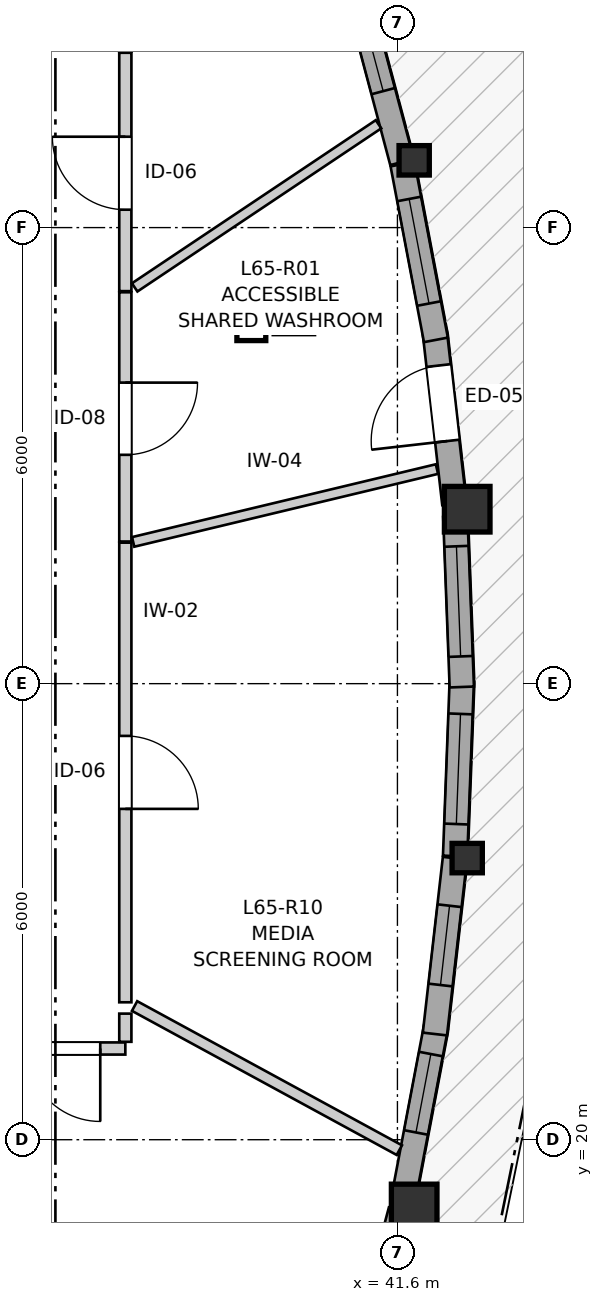
"""IFC4 building model, lengths in metres.
Left out: names, types, materials, properties, quantities, classifications, styles, units other than length and angle.
Written with IfcOpenShell. Run it as: python <this file> out.ifc"""

import sys

from ifc_helpers import new_model, si_unit, direction, frame, frame_2d, origin, origin_2d, place, context, subcontext, project, spatial, rectangle, i_section, extrude, source, transform, mapped, element, fill, save


model = new_model("IFC4")
c1 = context("Model", 3, precision=1e-05, world=origin(), true_north=direction((0.0, 1.0)))
c2 = subcontext(c1, "Body", "Model", "MODEL_VIEW")
j1 = project(units=[si_unit("LENGTHUNIT", "METRE"), si_unit("PLANEANGLEUNIT", "RADIAN")], contexts=[c1])
p1 = place(None, origin())
s1 = spatial("IfcSite", under=j1, at=p1, CompositionType="ELEMENT")
p2 = place(p1, origin())
s2 = spatial("IfcBuilding", under=s1, at=p2, CompositionType="ELEMENT")
p3 = place(p2, frame((0.0, 0.0, 218.0)))
s3 = spatial("IfcBuildingStorey", under=s2, at=p3, CompositionType="ELEMENT", Elevation=218.0)
m1 = source(origin(), c2, "Body", "SweptSolid", [
    extrude(rectangle(XDim=0.6, YDim=0.6, at=origin_2d()), origin(), (0.0, 0.0, 1.0), 2.96),
])
p4 = place(p3, frame((41.82, 19.115, 0.0), z_axis=(0.0, 0.0, 1.0), x_axis=(1.0, 0.0, 0.0)))
e1 = element("IfcColumn", 1, at=p4, inside=s3, PredefinedType="COLUMN", context=c2, shape_type="MappedRepresentation", body=[
    mapped(m1, transform((0.0, 0.0, 0.0), x_axis=(1.0, 0.0, 0.0), y_axis=(0.0, 1.0, 0.0), z_axis=(0.0, 0.0, 1.0), scale=1.0)),
])
m2 = source(origin(), c2, "Body", "SweptSolid", [
    extrude(i_section(OverallWidth=0.398, OverallDepth=0.387, WebThickness=0.019, FlangeThickness=0.03, FilletRadius=0.015, at=origin_2d()), origin(), (0.0, 0.0, 1.0), 2.96),
])
p5 = place(p3, frame((42.518, 23.705, 0.0), z_axis=(0.0, 0.0, 1.0), x_axis=(1.0, 0.0, 0.0)))
e2 = element("IfcColumn", 2, at=p5, inside=s3, PredefinedType="PILASTER", context=c2, shape_type="MappedRepresentation", body=[
    mapped(m2, transform((0.0, 0.0, 0.0), x_axis=(1.0, 0.0, 0.0), y_axis=(0.0, 1.0, 0.0), z_axis=(0.0, 0.0, 1.0), scale=1.0)),
])
p6 = place(p3, frame((42.518, 28.295, 0.0), z_axis=(0.0, 0.0, 1.0), x_axis=(1.0, 0.0, 0.0)))
e3 = element("IfcColumn", 3, at=p6, inside=s3, PredefinedType="COLUMN", context=c2, shape_type="MappedRepresentation", body=[
    mapped(m1, transform((0.0, 0.0, 0.0), x_axis=(1.0, 0.0, 0.0), y_axis=(0.0, 1.0, 0.0), z_axis=(0.0, 0.0, 1.0), scale=1.0)),
])
p7 = place(p3, frame((41.82, 32.885, 0.0), z_axis=(0.0, 0.0, 1.0), x_axis=(1.0, 0.0, 0.0)))
e4 = element("IfcColumn", 4, at=p7, inside=s3, PredefinedType="PILASTER", context=c2, shape_type="MappedRepresentation", body=[
    mapped(m2, transform((0.0, 0.0, 0.0), x_axis=(1.0, 0.0, 0.0), y_axis=(0.0, 1.0, 0.0), z_axis=(0.0, 0.0, 1.0), scale=1.0)),
])
p8 = place(p3, frame((41.045, 16.824, 0.0), z_axis=(0.0, 0.0, 1.0), x_axis=(0.257099982868, 0.966384808867, 0.0)))
e5 = element("IfcWall", 5, at=p8, inside=s3, PredefinedType="SOLIDWALL", context=c2, shape_type="SweptSolid", body=[
    extrude(rectangle(XDim=2.323, YDim=0.32, at=frame_2d((1.161, 0.0))), origin(), (0.0, 0.0, 1.0), 2.58),
])
p9 = place(p8, frame((0.491, 0.0, 0.82)))
e6 = element("IfcOpeningElement", 6, at=p9, cuts=e5, PredefinedType="OPENING", context=c2, shape_type="SweptSolid", body=[
    extrude(rectangle(XDim=1.35, YDim=1.45, at=frame_2d((0.675, 0.725))), frame((0.0, 0.17, 0.0), z_axis=(0.0, -1.0, 0.0), x_axis=(1.0, 0.0, 0.0)), (0.0, 0.0, 1.0), 0.34),
])
p10 = place(p3, frame((41.68, 19.233, 0.0), z_axis=(0.0, 0.0, 1.0), x_axis=(0.186630727552, 0.982430135701, 0.0)))
e7 = element("IfcWall", 7, at=p10, inside=s3, PredefinedType="SOLIDWALL", context=c2, shape_type="SweptSolid", body=[
    extrude(rectangle(XDim=2.284, YDim=0.32, at=frame_2d((1.142, 0.0))), origin(), (0.0, 0.0, 1.0), 2.58),
])
p11 = place(p10, frame((0.878, 0.0, 0.82)))
e8 = element("IfcOpeningElement", 8, at=p11, cuts=e7, PredefinedType="OPENING", context=c2, shape_type="SweptSolid", body=[
    extrude(rectangle(XDim=1.05, YDim=1.45, at=frame_2d((0.525, 0.725))), frame((0.0, 0.17, 0.0), z_axis=(0.0, -1.0, 0.0), x_axis=(1.0, 0.0, 0.0)), (0.0, 0.0, 1.0), 0.34),
])
p12 = place(p3, frame((42.093, 21.39, 0.0), z_axis=(0.0, 0.0, 1.0), x_axis=(0.113262644001, 0.993565082656, 0.0)))
e9 = element("IfcWall", 9, at=p12, inside=s3, PredefinedType="SOLIDWALL", context=c2, shape_type="SweptSolid", body=[
    extrude(rectangle(XDim=2.328, YDim=0.32, at=frame_2d((1.164, 0.0))), origin(), (0.0, 0.0, 1.0), 2.58),
])
p13 = place(p12, frame((0.649, 0.0, 0.82)))
e10 = element("IfcOpeningElement", 10, at=p13, cuts=e9, PredefinedType="OPENING", context=c2, shape_type="SweptSolid", body=[
    extrude(rectangle(XDim=1.05, YDim=1.45, at=frame_2d((0.525, 0.725))), frame((0.0, 0.17, 0.0), z_axis=(0.0, -1.0, 0.0), x_axis=(1.0, 0.0, 0.0)), (0.0, 0.0, 1.0), 0.34),
])
p14 = place(p3, frame((42.359, 23.731, 0.0), z_axis=(0.0, 0.0, 1.0), x_axis=(0.037975332386, 0.999278676912, 0.0)))
e11 = element("IfcWall", 11, at=p14, inside=s3, PredefinedType="SOLIDWALL", context=c2, shape_type="SweptSolid", body=[
    extrude(rectangle(XDim=2.314, YDim=0.32, at=frame_2d((1.157, 0.0))), origin(), (0.0, 0.0, 1.0), 2.58),
])
p15 = place(p14, frame((0.422, 0.0, 0.82)))
e12 = element("IfcOpeningElement", 12, at=p15, cuts=e11, PredefinedType="OPENING", context=c2, shape_type="SweptSolid", body=[
    extrude(rectangle(XDim=1.45, YDim=1.25, at=frame_2d((0.725, 0.625))), frame((0.0, 0.17, 0.0), z_axis=(0.0, -1.0, 0.0), x_axis=(1.0, 0.0, 0.0)), (0.0, 0.0, 1.0), 0.34),
])
p16 = place(p3, frame((42.447, 25.956, 0.0), z_axis=(0.0, 0.0, 1.0), x_axis=(-0.037961080573, 0.999279218418, 0.0)))
e13 = element("IfcWall", 13, at=p16, inside=s3, PredefinedType="SOLIDWALL", context=c2, shape_type="SweptSolid", body=[
    extrude(rectangle(XDim=2.245, YDim=0.32, at=frame_2d((1.122, 0.0))), origin(), (0.0, 0.0, 1.0), 2.58),
])
p17 = place(p16, frame((0.402, 0.0, 0.82)))
e14 = element("IfcOpeningElement", 14, at=p17, cuts=e13, PredefinedType="OPENING", context=c2, shape_type="SweptSolid", body=[
    extrude(rectangle(XDim=1.45, YDim=1.25, at=frame_2d((0.725, 0.625))), frame((0.0, 0.17, 0.0), z_axis=(0.0, -1.0, 0.0), x_axis=(1.0, 0.0, 0.0)), (0.0, 0.0, 1.0), 0.34),
])
p18 = place(p3, frame((42.349, 28.366, 0.0), z_axis=(0.0, 0.0, 1.0), x_axis=(-0.113314829757, 0.99355913229, 0.0)))
e15 = element("IfcWall", 15, at=p18, inside=s3, PredefinedType="SOLIDWALL", context=c2, shape_type="SweptSolid", body=[
    extrude(rectangle(XDim=2.258, YDim=0.32, at=frame_2d((1.129, 0.0))), origin(), (0.0, 0.0, 1.0), 2.58),
])
p19 = place(p18, frame((0.83, 0.0, 0.0)))
e16 = element("IfcOpeningElement", 16, at=p19, cuts=e15, PredefinedType="OPENING", context=c2, shape_type="SweptSolid", body=[
    extrude(rectangle(XDim=1.0, YDim=2.1, at=frame_2d((0.5, 1.05))), frame((0.0, 0.17, 0.0), z_axis=(0.0, -1.0, 0.0), x_axis=(1.0, 0.0, 0.0)), (0.0, 0.0, 1.0), 0.34),
])
p20 = place(p3, frame((42.106, 30.523, 0.0), z_axis=(0.0, 0.0, 1.0), x_axis=(-0.186673658051, 0.982421979289, 0.0)))
e17 = element("IfcWall", 17, at=p20, inside=s3, PredefinedType="SOLIDWALL", context=c2, shape_type="SweptSolid", body=[
    extrude(rectangle(XDim=2.354, YDim=0.32, at=frame_2d((1.177, 0.0))), origin(), (0.0, 0.0, 1.0), 2.58),
])
p21 = place(p20, frame((0.487, 0.0, 0.82)))
e18 = element("IfcOpeningElement", 18, at=p21, cuts=e17, PredefinedType="OPENING", context=c2, shape_type="SweptSolid", body=[
    extrude(rectangle(XDim=1.4, YDim=1.35, at=frame_2d((0.7, 0.675))), frame((0.0, 0.17, 0.0), z_axis=(0.0, -1.0, 0.0), x_axis=(1.0, 0.0, 0.0)), (0.0, 0.0, 1.0), 0.34),
])
p22 = place(p3, frame((41.66, 32.863, 0.0), z_axis=(0.0, 0.0, 1.0), x_axis=(-0.257008511659, 0.966409139513, 0.0)))
e19 = element("IfcWall", 19, at=p22, inside=s3, PredefinedType="SOLIDWALL", context=c2, shape_type="SweptSolid", body=[
    extrude(rectangle(XDim=2.393, YDim=0.32, at=frame_2d((1.196, 0.0))), origin(), (0.0, 0.0, 1.0), 2.58),
])
p23 = place(p22, frame((0.965, 0.0, 0.82)))
e20 = element("IfcOpeningElement", 20, at=p23, cuts=e19, PredefinedType="OPENING", context=c2, shape_type="SweptSolid", body=[
    extrude(rectangle(XDim=0.95, YDim=1.35, at=frame_2d((0.475, 0.675))), frame((0.0, 0.17, 0.0), z_axis=(0.0, -1.0, 0.0), x_axis=(1.0, 0.0, 0.0)), (0.0, 0.0, 1.0), 0.34),
])
p24 = place(p3, frame((38.02, 27.855, 0.0), z_axis=(0.0, 0.0, 1.0), x_axis=(0.0, -1.0, 0.0)))
e21 = element("IfcWall", 21, at=p24, inside=s3, PredefinedType="PARTITIONING", context=c2, shape_type="SweptSolid", body=[
    extrude(rectangle(XDim=6.047, YDim=0.16, at=frame_2d((3.023, 0.0))), origin(), (0.0, 0.0, 1.0), 2.96),
])
p25 = place(p24, frame((2.542, 0.0, 0.0)))
e22 = element("IfcOpeningElement", 22, at=p25, cuts=e21, PredefinedType="OPENING", context=c2, shape_type="SweptSolid", body=[
    extrude(rectangle(XDim=0.96, YDim=2.1, at=frame_2d((0.48, 1.05))), frame((0.0, 0.09, 0.0), z_axis=(0.0, -1.0, 0.0), x_axis=(1.0, 0.0, 0.0)), (0.0, 0.0, 1.0), 0.18),
])
p26 = place(p3, frame((38.02, 31.149, 0.0), z_axis=(0.0, 0.0, 1.0), x_axis=(0.0, -1.0, 0.0)))
e23 = element("IfcWall", 23, at=p26, inside=s3, PredefinedType="PARTITIONING", context=c2, shape_type="SweptSolid", body=[
    extrude(rectangle(XDim=3.279, YDim=0.16, at=frame_2d((1.639, 0.0))), origin(), (0.0, 0.0, 1.0), 2.628),
])
p27 = place(p26, frame((1.188, 0.0, 0.0)))
e24 = element("IfcOpeningElement", 24, at=p27, cuts=e23, PredefinedType="OPENING", context=c2, shape_type="SweptSolid", body=[
    extrude(rectangle(XDim=0.95, YDim=2.1, at=frame_2d((0.475, 1.05))), frame((0.0, 0.09, 0.0), z_axis=(0.0, -1.0, 0.0), x_axis=(1.0, 0.0, 0.0)), (0.0, 0.0, 1.0), 0.18),
])
p28 = place(p3, frame((38.02, 31.164, 0.0), z_axis=(0.0, 0.0, 1.0), x_axis=(0.0, 1.0, 0.0)))
e25 = element("IfcWall", 25, at=p28, inside=s3, PredefinedType="PARTITIONING", context=c2, shape_type="SweptSolid", body=[
    extrude(rectangle(XDim=3.136, YDim=0.16, at=frame_2d((1.568, 0.0))), origin(), (0.0, 0.0, 1.0), 2.628),
])
p29 = place(p28, frame((1.072, 0.0, 0.0)))
e26 = element("IfcOpeningElement", 26, at=p29, cuts=e25, PredefinedType="OPENING", context=c2, shape_type="SweptSolid", body=[
    extrude(rectangle(XDim=0.96, YDim=2.1, at=frame_2d((0.48, 1.05))), frame((0.0, 0.09, 0.0), z_axis=(0.0, -1.0, 0.0), x_axis=(1.0, 0.0, 0.0)), (0.0, 0.0, 1.0), 0.18),
])
p30 = place(p3, frame((38.02, 21.2, 0.0), z_axis=(0.0, 0.0, 1.0), x_axis=(-1.0, 0.0, 0.0)))
e27 = element("IfcWall", 27, at=p30, inside=s3, PredefinedType="PARTITIONING", context=c2, shape_type="SweptSolid", body=[
    extrude(rectangle(XDim=1.612, YDim=0.16, at=frame_2d((0.806, 0.0))), origin(), (0.0, 0.0, 1.0), 2.96),
])
p31 = place(p30, frame((0.33, 0.0, 0.0)))
e28 = element("IfcOpeningElement", 28, at=p31, cuts=e27, PredefinedType="OPENING", context=c2, shape_type="SweptSolid", body=[
    extrude(rectangle(XDim=0.96, YDim=2.1, at=frame_2d((0.48, 1.05))), frame((0.0, 0.09, 0.0), z_axis=(0.0, -1.0, 0.0), x_axis=(1.0, 0.0, 0.0)), (0.0, 0.0, 1.0), 0.18),
])
p32 = place(p3, frame((38.123, 27.865, 0.0), z_axis=(0.0, 0.0, 1.0), x_axis=(0.972444961782, 0.233132572379, 0.0)))
e29 = element("IfcWall", 29, at=p32, inside=s3, PredefinedType="PARTITIONING", context=c2, shape_type="SweptSolid", body=[
    extrude(rectangle(XDim=4.11, YDim=0.13, at=frame_2d((2.055, 0.0))), origin(), (0.0, 0.0, 1.0), 2.96),
])
p33 = place(p3, frame((38.142, 21.759, 0.0), z_axis=(0.0, 0.0, 1.0), x_axis=(0.878323390095, -0.478066964359, 0.0)))
e30 = element("IfcWall", 30, at=p33, inside=s3, PredefinedType="PARTITIONING", context=c2, shape_type="SweptSolid", body=[
    extrude(rectangle(XDim=3.966, YDim=0.145, at=frame_2d((1.983, 0.0))), origin(), (0.0, 0.0, 1.0), 2.96),
])
p34 = place(p3, frame((38.143, 31.213, 0.0), z_axis=(0.0, 0.0, 1.0), x_axis=(0.831154063558, 0.556042195009, 0.0)))
e31 = element("IfcWall", 31, at=p34, inside=s3, PredefinedType="PARTITIONING", context=c2, shape_type="SweptSolid", body=[
    extrude(rectangle(XDim=3.86, YDim=0.13, at=frame_2d((1.93, 0.0))), origin(), (0.0, 0.0, 1.0), 2.96),
])
p35 = place(p3, frame((38.02, 21.288, 0.0), z_axis=(0.0, 0.0, 1.0), x_axis=(0.0, 1.0, 0.0)))
e32 = element("IfcWall", 32, at=p35, inside=s3, PredefinedType="PARTITIONING", context=c2, shape_type="SweptSolid", body=[
    extrude(rectangle(XDim=0.371, YDim=0.16, at=frame_2d((0.186, 0.0))), origin(), (0.0, 0.0, 1.0), 2.96),
])
m3 = source(origin(), c2, "Body", "SweptSolid", [
    extrude(rectangle(XDim=1.05, YDim=1.45, at=frame_2d((0.525, 0.725))), frame((0.0, 0.03, 0.0), z_axis=(0.0, -1.0, 0.0), x_axis=(1.0, 0.0, 0.0)), (0.0, 0.0, 1.0), 0.06),
])
p36 = place(p11, origin())
e33 = element("IfcWindow", 33, at=p36, inside=s3, PartitioningType="SINGLE_PANEL", PredefinedType="WINDOW", context=c2, shape_type="MappedRepresentation", body=[
    mapped(m3, transform((0.0, 0.0, 0.0), x_axis=(1.0, 0.0, 0.0), y_axis=(0.0, 1.0, 0.0), z_axis=(0.0, 0.0, 1.0), scale=1.0)),
])
fill(e8, e33)
p37 = place(p13, origin())
e34 = element("IfcWindow", 34, at=p37, inside=s3, PartitioningType="SINGLE_PANEL", PredefinedType="WINDOW", context=c2, shape_type="MappedRepresentation", body=[
    mapped(m3, transform((0.0, 0.0, 0.0), x_axis=(1.0, 0.0, 0.0), y_axis=(0.0, 1.0, 0.0), z_axis=(0.0, 0.0, 1.0), scale=1.0)),
])
fill(e10, e34)
m4 = source(origin(), c2, "Body", "SweptSolid", [
    extrude(rectangle(XDim=1.45, YDim=1.25, at=frame_2d((0.725, 0.625))), frame((0.0, 0.03, 0.0), z_axis=(0.0, -1.0, 0.0), x_axis=(1.0, 0.0, 0.0)), (0.0, 0.0, 1.0), 0.06),
])
p38 = place(p15, origin())
e35 = element("IfcWindow", 35, at=p38, inside=s3, PartitioningType="SINGLE_PANEL", PredefinedType="WINDOW", context=c2, shape_type="MappedRepresentation", body=[
    mapped(m4, transform((0.0, 0.0, 0.0), x_axis=(1.0, 0.0, 0.0), y_axis=(0.0, 1.0, 0.0), z_axis=(0.0, 0.0, 1.0), scale=1.0)),
])
fill(e12, e35)
p39 = place(p17, origin())
e36 = element("IfcWindow", 36, at=p39, inside=s3, PartitioningType="SINGLE_PANEL", PredefinedType="WINDOW", context=c2, shape_type="MappedRepresentation", body=[
    mapped(m4, transform((0.0, 0.0, 0.0), x_axis=(1.0, 0.0, 0.0), y_axis=(0.0, 1.0, 0.0), z_axis=(0.0, 0.0, 1.0), scale=1.0)),
])
fill(e14, e36)
m5 = source(origin(), c2, "Body", "SweptSolid", [
    extrude(rectangle(XDim=1.0, YDim=2.1, at=frame_2d((0.5, 1.05))), frame((0.0, 0.025, 0.0), z_axis=(0.0, -1.0, 0.0), x_axis=(1.0, 0.0, 0.0)), (0.0, 0.0, 1.0), 0.05),
])
p40 = place(p19, origin())
e37 = element("IfcDoor", 37, at=p40, inside=s3, OperationType="SINGLE_SWING_LEFT", PredefinedType="DOOR", context=c2, shape_type="MappedRepresentation", body=[
    mapped(m5, transform((0.0, 0.0, 0.0), x_axis=(1.0, 0.0, 0.0), y_axis=(0.0, 1.0, 0.0), z_axis=(0.0, 0.0, 1.0), scale=1.0)),
])
fill(e16, e37)
m6 = source(origin(), c2, "Body", "SweptSolid", [
    extrude(rectangle(XDim=1.4, YDim=1.35, at=frame_2d((0.7, 0.675))), frame((0.0, 0.03, 0.0), z_axis=(0.0, -1.0, 0.0), x_axis=(1.0, 0.0, 0.0)), (0.0, 0.0, 1.0), 0.06),
])
p41 = place(p21, origin())
e38 = element("IfcWindow", 38, at=p41, inside=s3, PartitioningType="SINGLE_PANEL", PredefinedType="WINDOW", context=c2, shape_type="MappedRepresentation", body=[
    mapped(m6, transform((0.0, 0.0, 0.0), x_axis=(1.0, 0.0, 0.0), y_axis=(0.0, 1.0, 0.0), z_axis=(0.0, 0.0, 1.0), scale=1.0)),
])
fill(e18, e38)
m7 = source(origin(), c2, "Body", "SweptSolid", [
    extrude(rectangle(XDim=0.95, YDim=1.35, at=frame_2d((0.475, 0.675))), frame((0.0, 0.03, 0.0), z_axis=(0.0, -1.0, 0.0), x_axis=(1.0, 0.0, 0.0)), (0.0, 0.0, 1.0), 0.06),
])
p42 = place(p23, origin())
e39 = element("IfcWindow", 39, at=p42, inside=s3, PartitioningType="SINGLE_PANEL", PredefinedType="WINDOW", context=c2, shape_type="MappedRepresentation", body=[
    mapped(m7, transform((0.0, 0.0, 0.0), x_axis=(1.0, 0.0, 0.0), y_axis=(0.0, 1.0, 0.0), z_axis=(0.0, 0.0, 1.0), scale=1.0)),
])
fill(e20, e39)
m8 = source(origin(), c2, "Body", "SweptSolid", [
    extrude(rectangle(XDim=0.96, YDim=2.1, at=frame_2d((0.48, 1.05))), frame((0.0, 0.025, 0.0), z_axis=(0.0, -1.0, 0.0), x_axis=(1.0, 0.0, 0.0)), (0.0, 0.0, 1.0), 0.05),
])
p43 = place(p25, origin())
e40 = element("IfcDoor", 40, at=p43, inside=s3, OperationType="SINGLE_SWING_RIGHT", PredefinedType="DOOR", context=c2, shape_type="MappedRepresentation", body=[
    mapped(m8, transform((0.0, 0.0, 0.0), x_axis=(1.0, 0.0, 0.0), y_axis=(0.0, 1.0, 0.0), z_axis=(0.0, 0.0, 1.0), scale=1.0)),
])
fill(e22, e40)
m9 = source(origin(), c2, "Body", "SweptSolid", [
    extrude(rectangle(XDim=0.95, YDim=2.1, at=frame_2d((0.475, 1.05))), frame((0.0, 0.025, 0.0), z_axis=(0.0, -1.0, 0.0), x_axis=(1.0, 0.0, 0.0)), (0.0, 0.0, 1.0), 0.05),
])
p44 = place(p27, origin())
e41 = element("IfcDoor", 41, at=p44, inside=s3, OperationType="SINGLE_SWING_LEFT", PredefinedType="DOOR", context=c2, shape_type="MappedRepresentation", body=[
    mapped(m9, transform((0.0, 0.0, 0.0), x_axis=(1.0, 0.0, 0.0), y_axis=(0.0, 1.0, 0.0), z_axis=(0.0, 0.0, 1.0), scale=1.0)),
])
fill(e24, e41)
p45 = place(p29, origin())
e42 = element("IfcDoor", 42, at=p45, inside=s3, OperationType="SINGLE_SWING_RIGHT", PredefinedType="DOOR", context=c2, shape_type="MappedRepresentation", body=[
    mapped(m8, transform((0.0, 0.0, 0.0), x_axis=(1.0, 0.0, 0.0), y_axis=(0.0, 1.0, 0.0), z_axis=(0.0, 0.0, 1.0), scale=1.0)),
])
fill(e26, e42)
p46 = place(p31, origin())
e43 = element("IfcDoor", 43, at=p46, inside=s3, OperationType="SINGLE_SWING_LEFT", PredefinedType="DOOR", context=c2, shape_type="MappedRepresentation", body=[
    mapped(m8, transform((0.0, 0.0, 0.0), x_axis=(1.0, 0.0, 0.0), y_axis=(0.0, 1.0, 0.0), z_axis=(0.0, 0.0, 1.0), scale=1.0)),
])
fill(e28, e43)
save(model, sys.argv[1])
